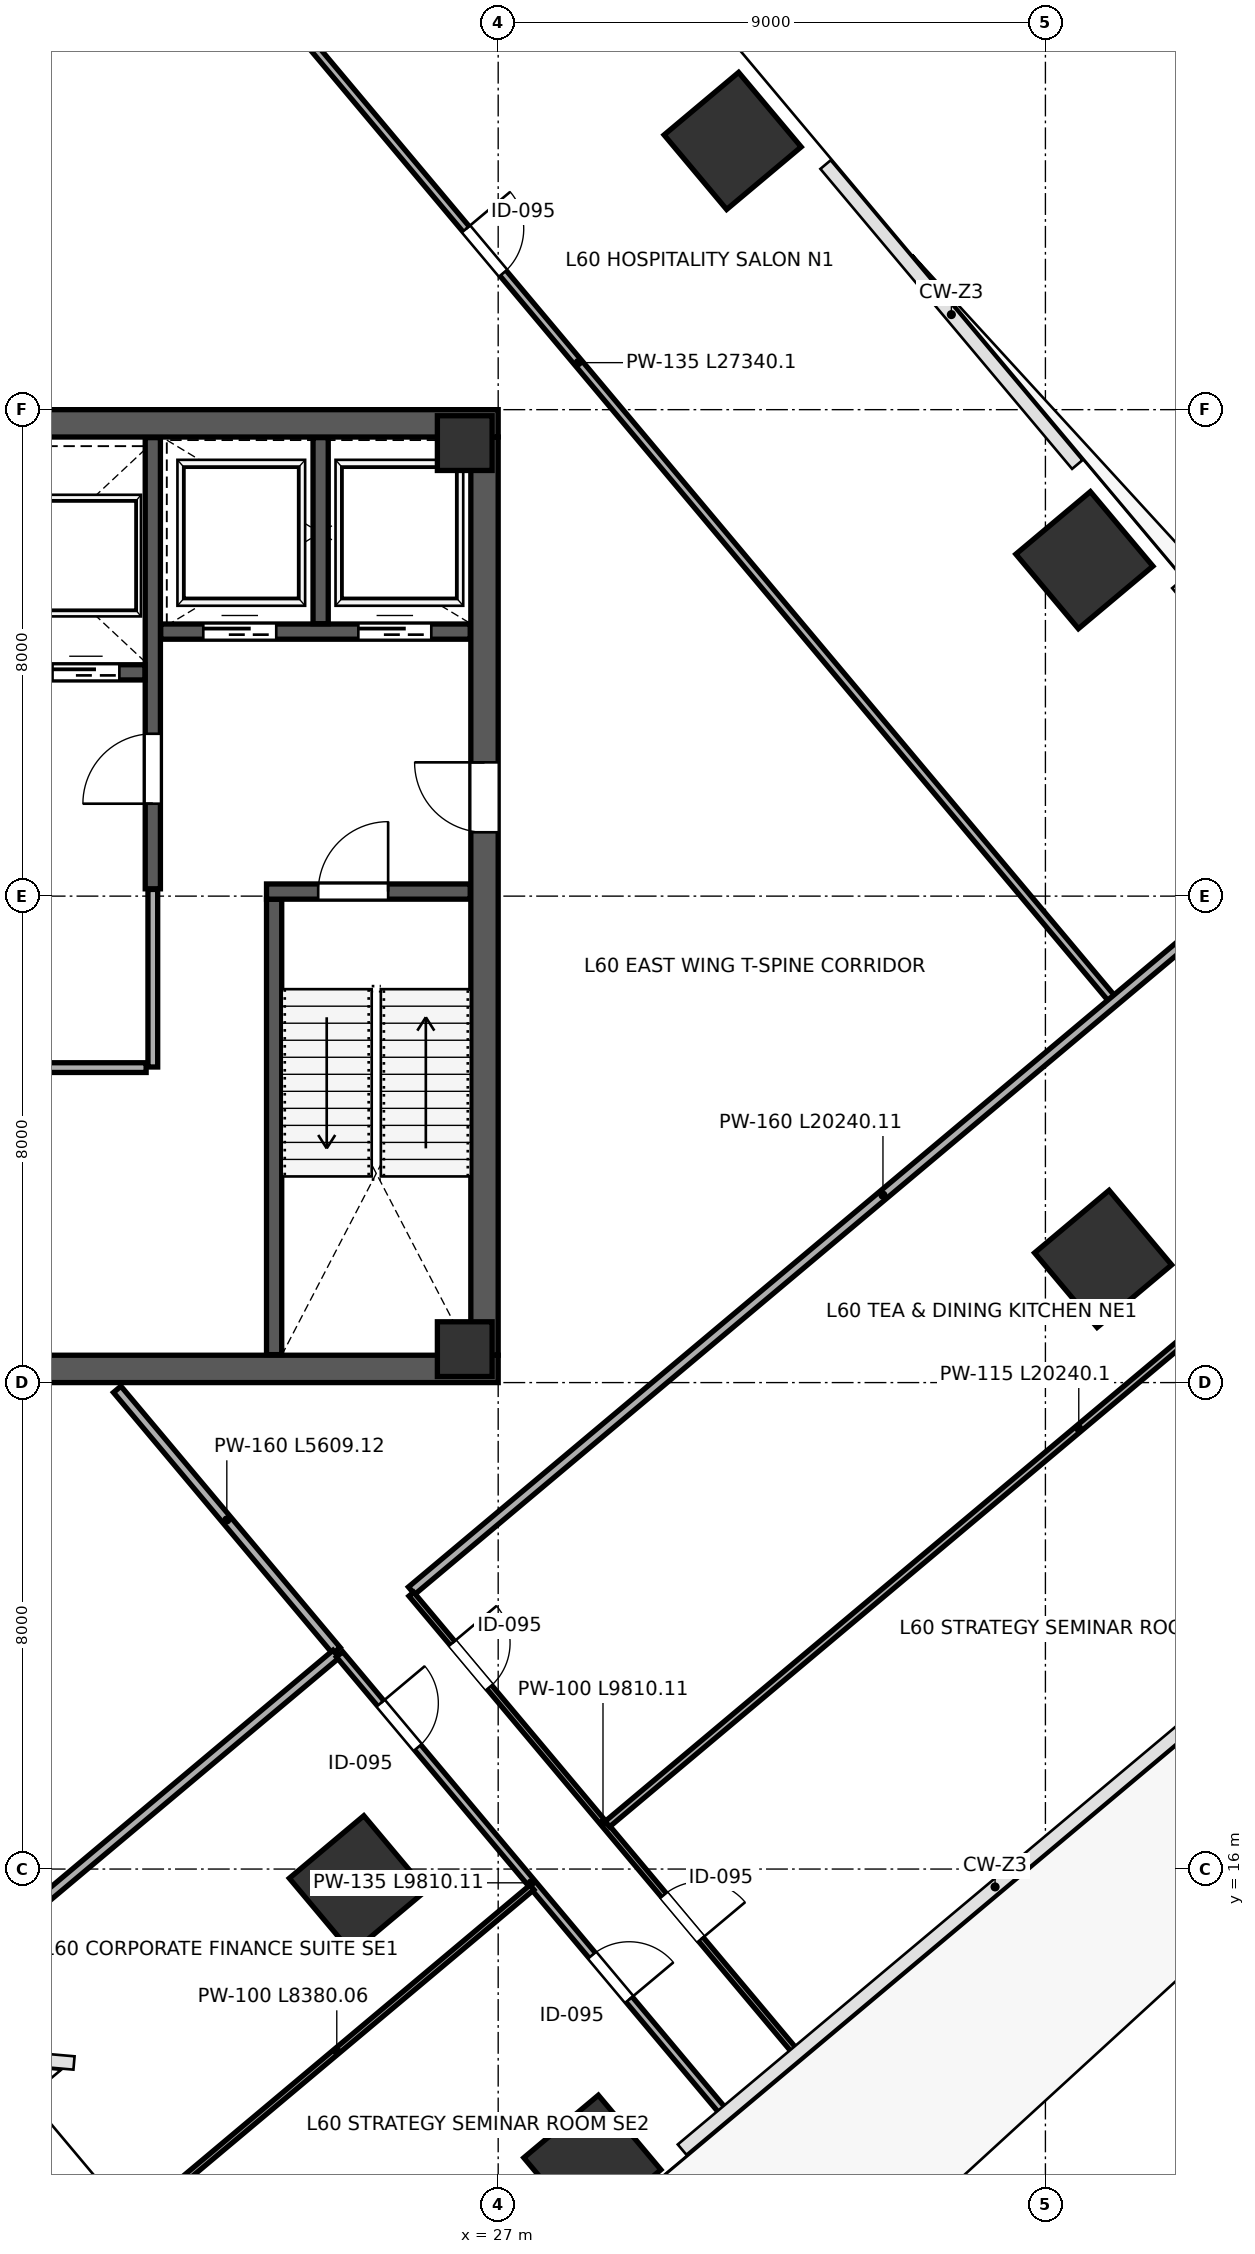
"""IFC4 building model, lengths in metres.
Left out: names, types, materials, properties, quantities, classifications, styles, units other than length and angle.
Written with IfcOpenShell. Run it as: python <this file> out.ifc"""

import sys

from ifc_helpers import new_model, si_unit, direction, frame, frame_2d, origin, origin_2d, place, context, subcontext, project, spatial, rectangle, extrude, source, transform, mapped, element, fill, save


model = new_model("IFC4")
c1 = context("Model", 3, precision=1e-05, world=origin(), true_north=direction((0.0, 1.0)))
c2 = subcontext(c1, "Body", "Model", "MODEL_VIEW")
j1 = project(units=[si_unit("LENGTHUNIT", "METRE"), si_unit("PLANEANGLEUNIT", "RADIAN")], contexts=[c1])
p1 = place(None, origin())
s1 = spatial("IfcSite", under=j1, at=p1, CompositionType="ELEMENT")
p2 = place(p1, origin())
s2 = spatial("IfcBuilding", under=s1, at=p2, CompositionType="ELEMENT")
p3 = place(p2, frame((0.0, 0.0, 266.8)))
s3 = spatial("IfcBuildingStorey", under=s2, at=p3, CompositionType="ELEMENT", Elevation=266.8)
m1 = source(origin(), c2, "Body", "SweptSolid", [
    extrude(rectangle(XDim=0.9, YDim=0.9, at=origin_2d()), origin(), (0.0, 0.0, 1.0), 4.198),
])
for number, where, z_axis, x_axis in (
    (1, (26.45, 24.55, 0.001), (0.0, 0.0, 1.0), (1.0, 0.0, 0.0)),
    (2, (26.45, 39.45, 0.001), (0.0, 0.0, 1.0), (1.0, 0.0, 0.0)),
):
    element("IfcColumn", number, at=place(p3, frame(where, z_axis=z_axis, x_axis=x_axis)), inside=s3, PredefinedType="COLUMN", context=c2, shape_type="MappedRepresentation", body=[
        mapped(m1, transform((0.0, 0.0, 0.0), scale=1.0)),
    ])
m2 = source(origin(), c2, "Body", "SweptSolid", [
    extrude(rectangle(XDim=1.6, YDim=1.6, at=origin_2d()), origin(), (0.0, 0.0, 1.0), 4.198),
])
for number, where, z_axis, x_axis in (
    (3, (30.856, 44.419, 0.001), (0.0, 0.0, 1.0), (-0.643, 0.766, 0.0)),
    (4, (36.641, 37.525, 0.001), (0.0, 0.0, 1.0), (-0.643, 0.766, 0.0)),
):
    element("IfcColumn", number, at=place(p3, frame(where, z_axis=z_axis, x_axis=x_axis)), inside=s3, PredefinedType="COLUMN", context=c2, shape_type="MappedRepresentation", body=[
        mapped(m2, transform((0.0, 0.0, 0.0), scale=1.0)),
    ])
m3 = source(origin(), c2, "Body", "SweptSolid", [
    extrude(rectangle(XDim=1.6, YDim=1.6, at=origin_2d()), origin(), (0.0, 0.0, 1.0), 4.198),
])
for number, where, z_axis, x_axis in (
    (5, (24.692, 15.75, 0.001), (0.0, 0.0, 1.0), (-0.643, 0.766, 0.0)),
    (6, (36.949, 26.035, 0.001), (0.0, 0.0, 1.0), (-0.643, 0.766, 0.0)),
):
    element("IfcColumn", number, at=place(p3, frame(where, z_axis=z_axis, x_axis=x_axis)), inside=s3, PredefinedType="COLUMN", context=c2, shape_type="MappedRepresentation", body=[
        mapped(m3, transform((0.0, 0.0, 0.0), scale=1.0)),
    ])
p4 = place(p3, frame((28.549, 11.154, 0.001), z_axis=(0.0, 0.0, 1.0), x_axis=(-0.642787609687, 0.766044443119, 0.0)))
e7 = element("IfcColumn", 7, at=p4, inside=s3, PredefinedType="COLUMN", context=c2, shape_type="MappedRepresentation", body=[
    mapped(m2, transform((0.0, 0.0, 0.0), scale=1.0)),
])
p5 = place(p3, frame((26.775, 24.45, 0.0), z_axis=(0.0, 0.0, 1.0), x_axis=(0.0, 1.0, 0.0)))
e8 = element("IfcWall", 8, at=p5, inside=s3, PredefinedType="SHEAR", context=c2, shape_type="SweptSolid", body=[
    extrude(rectangle(XDim=15.1, YDim=0.45, at=frame_2d((7.55, 0.0))), origin(), (0.0, 0.0, 1.0), 3.96),
])
p6 = place(p5, frame((8.6, 0.0, 0.0)))
e9 = element("IfcOpeningElement", 9, at=p6, cuts=e8, PredefinedType="OPENING", context=c2, shape_type="SweptSolid", body=[
    extrude(rectangle(XDim=1.15, YDim=2.2, at=frame_2d((0.575, 1.1))), frame((0.0, 0.235, 0.0), z_axis=(0.0, -1.0, 0.0), x_axis=(1.0, 0.0, 0.0)), (0.0, 0.0, 1.0), 0.47),
])
for number, where, z_axis, x_axis in (
    (10, (9.0, 24.225, 0.0), (0.0, 0.0, 1.0), (1.0, 0.0, 0.0)),
    (11, (9.0, 39.775, 0.0), (0.0, 0.0, 1.0), (1.0, 0.0, 0.0)),
):
    element("IfcWall", number, at=place(p3, frame(where, z_axis=z_axis, x_axis=x_axis)), inside=s3, PredefinedType="SHEAR", context=c2, shape_type="SweptSolid", body=[
        extrude(rectangle(XDim=18.0, YDim=0.45, at=frame_2d((9.0, 0.0))), origin(), (0.0, 0.0, 1.0), 3.96),
    ])
p7 = place(p3, frame((23.315, 24.46, 0.0), z_axis=(0.0, 0.0, 1.0), x_axis=(0.0, 1.0, 0.0)))
e12 = element("IfcWall", 12, at=p7, inside=s3, PredefinedType="SHEAR", context=c2, shape_type="SweptSolid", body=[
    extrude(rectangle(XDim=7.49, YDim=0.25, at=frame_2d((3.745, 0.0))), origin(), (0.0, 0.0, 1.0), 3.96),
])
p8 = place(p3, frame((23.19, 32.075, 0.0), z_axis=(0.0, 0.0, 1.0), x_axis=(1.0, 0.0, 0.0)))
e13 = element("IfcWall", 13, at=p8, inside=s3, PredefinedType="SHEAR", context=c2, shape_type="SweptSolid", body=[
    extrude(rectangle(XDim=3.35, YDim=0.25, at=frame_2d((1.675, 0.0))), origin(), (0.0, 0.0, 1.0), 3.96),
])
p9 = place(p8, frame((0.85, 0.0, 0.0)))
e14 = element("IfcOpeningElement", 14, at=p9, cuts=e13, PredefinedType="OPENING", context=c2, shape_type="SweptSolid", body=[
    extrude(rectangle(XDim=1.15, YDim=2.2, at=frame_2d((0.575, 1.1))), frame((0.0, 0.135, 0.0), z_axis=(0.0, -1.0, 0.0), x_axis=(1.0, 0.0, 0.0)), (0.0, 0.0, 1.0), 0.27),
])
p10 = place(p3, frame((21.32, 32.12, 0.0), z_axis=(0.0, 0.0, 1.0), x_axis=(0.0, 1.0, 0.0)))
e15 = element("IfcWall", 15, at=p10, inside=s3, PredefinedType="SHEAR", context=c2, shape_type="SweptSolid", body=[
    extrude(rectangle(XDim=7.42, YDim=0.25, at=frame_2d((3.71, 0.0))), origin(), (0.0, 0.0, 1.0), 3.96),
])
p11 = place(p10, frame((1.4, 0.0, 0.0)))
e16 = element("IfcOpeningElement", 16, at=p11, cuts=e15, PredefinedType="OPENING", context=c2, shape_type="SweptSolid", body=[
    extrude(rectangle(XDim=1.15, YDim=2.2, at=frame_2d((0.575, 1.1))), frame((0.0, 0.135, 0.0), z_axis=(0.0, -1.0, 0.0), x_axis=(1.0, 0.0, 0.0)), (0.0, 0.0, 1.0), 0.27),
])
p12 = place(p3, frame((21.45, 36.35, 0.0), z_axis=(0.0, 0.0, 1.0), x_axis=(1.0, 0.0, 0.0)))
e17 = element("IfcWall", 17, at=p12, inside=s3, PredefinedType="SHEAR", context=c2, shape_type="SweptSolid", body=[
    extrude(rectangle(XDim=5.09, YDim=0.25, at=frame_2d((2.545, 0.0))), origin(), (0.0, 0.0, 1.0), 3.96),
])
p13 = place(p12, frame((0.7, 0.0, 0.0)))
e18 = element("IfcOpeningElement", 18, at=p13, cuts=e17, PredefinedType="OPENING", context=c2, shape_type="SweptSolid", body=[
    extrude(rectangle(XDim=1.2, YDim=2.2, at=frame_2d((0.6, 1.1))), frame((0.0, 0.135, 0.0), z_axis=(0.0, -1.0, 0.0), x_axis=(1.0, 0.0, 0.0)), (0.0, 0.0, 1.0), 0.27),
])
p14 = place(p12, frame((3.25, 0.0, 0.0)))
e19 = element("IfcOpeningElement", 19, at=p14, cuts=e17, PredefinedType="OPENING", context=c2, shape_type="SweptSolid", body=[
    extrude(rectangle(XDim=1.2, YDim=2.2, at=frame_2d((0.6, 1.1))), frame((0.0, 0.135, 0.0), z_axis=(0.0, -1.0, 0.0), x_axis=(1.0, 0.0, 0.0)), (0.0, 0.0, 1.0), 0.27),
])
p15 = place(p3, frame((24.08, 36.48, 0.0), z_axis=(0.0, 0.0, 1.0), x_axis=(0.0, 1.0, 0.0)))
e20 = element("IfcWall", 20, at=p15, inside=s3, PredefinedType="SHEAR", context=c2, shape_type="SweptSolid", body=[
    extrude(rectangle(XDim=3.06, YDim=0.25, at=frame_2d((1.53, 0.0))), origin(), (0.0, 0.0, 1.0), 3.96),
])
p16 = place(p3, frame((17.32, 35.68, 0.0), z_axis=(0.0, 0.0, 1.0), x_axis=(1.0, 0.0, 0.0)))
e21 = element("IfcWall", 21, at=p16, inside=s3, PredefinedType="SHEAR", context=c2, shape_type="SweptSolid", body=[
    extrude(rectangle(XDim=3.87, YDim=0.25, at=frame_2d((1.935, 0.0))), origin(), (0.0, 0.0, 1.0), 3.96),
])
p17 = place(p16, frame((0.45, 0.0, 0.0)))
e22 = element("IfcOpeningElement", 22, at=p17, cuts=e21, PredefinedType="OPENING", context=c2, shape_type="SweptSolid", body=[
    extrude(rectangle(XDim=1.1, YDim=2.2, at=frame_2d((0.55, 1.1))), frame((0.0, 0.135, 0.0), z_axis=(0.0, -1.0, 0.0), x_axis=(1.0, 0.0, 0.0)), (0.0, 0.0, 1.0), 0.27),
])
p18 = place(p16, frame((2.35, 0.0, 0.0)))
e23 = element("IfcOpeningElement", 23, at=p18, cuts=e21, PredefinedType="OPENING", context=c2, shape_type="SweptSolid", body=[
    extrude(rectangle(XDim=1.1, YDim=2.2, at=frame_2d((0.55, 1.1))), frame((0.0, 0.135, 0.0), z_axis=(0.0, -1.0, 0.0), x_axis=(1.0, 0.0, 0.0)), (0.0, 0.0, 1.0), 0.27),
])
p19 = place(p3, frame((12.84, 29.18, 0.0), z_axis=(0.0, 0.0, 1.0), x_axis=(1.0, 0.0, 0.0)))
e24 = element("IfcWall", 24, at=p19, inside=s3, PredefinedType="PARTITIONING", context=c2, shape_type="SweptSolid", body=[
    extrude(rectangle(XDim=8.37, YDim=0.16, at=frame_2d((4.185, 0.0))), origin(), (0.0, 0.0, 1.0), 3.96),
])
p20 = place(p19, frame((0.95, 0.0, 0.0)))
e25 = element("IfcOpeningElement", 25, at=p20, cuts=e24, PredefinedType="OPENING", context=c2, shape_type="SweptSolid", body=[
    extrude(rectangle(XDim=0.85, YDim=2.1, at=frame_2d((0.425, 1.05))), frame((0.0, 0.09, 0.0), z_axis=(0.0, -1.0, 0.0), x_axis=(1.0, 0.0, 0.0)), (0.0, 0.0, 1.0), 0.18),
])
p21 = place(p19, frame((4.2, 0.0, 0.0)))
e26 = element("IfcOpeningElement", 26, at=p21, cuts=e24, PredefinedType="OPENING", context=c2, shape_type="SweptSolid", body=[
    extrude(rectangle(XDim=0.85, YDim=2.1, at=frame_2d((0.425, 1.05))), frame((0.0, 0.09, 0.0), z_axis=(0.0, -1.0, 0.0), x_axis=(1.0, 0.0, 0.0)), (0.0, 0.0, 1.0), 0.18),
])
p22 = place(p3, frame((21.32, 29.19, 0.0), z_axis=(0.0, 0.0, 1.0), x_axis=(0.0, 1.0, 0.0)))
e27 = element("IfcWall", 27, at=p22, inside=s3, PredefinedType="PARTITIONING", context=c2, shape_type="SweptSolid", body=[
    extrude(rectangle(XDim=2.92, YDim=0.16, at=frame_2d((1.46, 0.0))), origin(), (0.0, 0.0, 1.0), 3.96),
])
p23 = place(p3, frame((20.734, 23.889, 0.0), z_axis=(0.0, 0.0, 1.0), x_axis=(0.642758145725, -0.766069165353, 0.0)))
e28 = element("IfcWall", 28, at=p23, inside=s3, PredefinedType="PARTITIONING", context=c2, shape_type="SweptSolid", body=[
    extrude(rectangle(XDim=5.609, YDim=0.16, at=frame_2d((2.804, 0.0))), origin(), (0.0, 0.0, 1.0), 3.96),
])
p24 = place(p3, frame((19.528, 51.245, 0.0), z_axis=(0.0, 0.0, 1.0), x_axis=(0.642782364439, -0.766048844374, 0.0)))
e29 = element("IfcWall", 29, at=p24, inside=s3, PredefinedType="PARTITIONING", context=c2, shape_type="SweptSolid", body=[
    extrude(rectangle(XDim=27.34, YDim=0.135, at=frame_2d((13.67, 0.0))), origin(), (0.0, 0.0, 1.0), 3.96),
])
p25 = place(p24, frame((10.8, 0.0, 0.0)))
e30 = element("IfcOpeningElement", 30, at=p25, cuts=e29, PredefinedType="OPENING", context=c2, shape_type="SweptSolid", body=[
    extrude(rectangle(XDim=0.95, YDim=2.15, at=frame_2d((0.475, 1.075))), frame((0.0, 0.078, 0.0), z_axis=(0.0, -1.0, 0.0), x_axis=(1.0, 0.0, 0.0)), (0.0, 0.0, 1.0), 0.155),
])
p26 = place(p3, frame((0.849, 35.624, 0.0), z_axis=(0.0, 0.0, 1.0), x_axis=(0.766042777978, 0.642789594119, 0.0)))
e31 = element("IfcWall", 31, at=p26, inside=s3, PredefinedType="PARTITIONING", context=c2, shape_type="SweptSolid", body=[
    extrude(rectangle(XDim=29.51, YDim=0.1, at=frame_2d((14.755, 0.0))), origin(), (0.0, 0.0, 1.0), 3.96),
])
p27 = place(p26, frame((2.6, 0.0, 0.0)))
e32 = element("IfcOpeningElement", 32, at=p27, cuts=e31, PredefinedType="OPENING", context=c2, shape_type="SweptSolid", body=[
    extrude(rectangle(XDim=0.95, YDim=2.15, at=frame_2d((0.475, 1.075))), frame((0.0, 0.06, 0.0), z_axis=(0.0, -1.0, 0.0), x_axis=(1.0, 0.0, 0.0)), (0.0, 0.0, 1.0), 0.12),
])
p28 = place(p3, frame((25.576, 20.577, 0.0), z_axis=(0.0, 0.0, 1.0), x_axis=(0.76604764673, 0.642783791752, 0.0)))
e33 = element("IfcWall", 33, at=p28, inside=s3, PredefinedType="PARTITIONING", context=c2, shape_type="SweptSolid", body=[
    extrude(rectangle(XDim=20.24, YDim=0.16, at=frame_2d((10.12, 0.0))), origin(), (0.0, 0.0, 1.0), 3.195),
])
p29 = place(p3, frame((16.711, 13.139, 0.0), z_axis=(0.0, 0.0, 1.0), x_axis=(0.766041122188, 0.642791567398, 0.0)))
e34 = element("IfcWall", 34, at=p29, inside=s3, PredefinedType="PARTITIONING", context=c2, shape_type="SweptSolid", body=[
    extrude(rectangle(XDim=9.952, YDim=0.16, at=frame_2d((4.976, 0.0))), origin(), (0.0, 0.0, 1.0), 3.96),
])
p30 = place(p3, frame((25.571, 20.521, 0.0), z_axis=(0.0, 0.0, 1.0), x_axis=(0.64278520229, -0.766046463158, 0.0)))
e35 = element("IfcWall", 35, at=p30, inside=s3, PredefinedType="PARTITIONING", context=c2, shape_type="SweptSolid", body=[
    extrude(rectangle(XDim=9.81, YDim=0.1, at=frame_2d((4.905, 0.0))), origin(), (0.0, 0.0, 1.0), 3.96),
])
p31 = place(p30, frame((1.05, 0.0, 0.0)))
e36 = element("IfcOpeningElement", 36, at=p31, cuts=e35, PredefinedType="OPENING", context=c2, shape_type="SweptSolid", body=[
    extrude(rectangle(XDim=0.95, YDim=2.15, at=frame_2d((0.475, 1.075))), frame((0.0, 0.06, 0.0), z_axis=(0.0, -1.0, 0.0), x_axis=(1.0, 0.0, 0.0)), (0.0, 0.0, 1.0), 0.12),
])
p32 = place(p30, frame((6.46, 0.0, 0.0)))
e37 = element("IfcOpeningElement", 37, at=p32, cuts=e35, PredefinedType="OPENING", context=c2, shape_type="SweptSolid", body=[
    extrude(rectangle(XDim=0.95, YDim=2.15, at=frame_2d((0.475, 1.075))), frame((0.0, 0.06, 0.0), z_axis=(0.0, -1.0, 0.0), x_axis=(1.0, 0.0, 0.0)), (0.0, 0.0, 1.0), 0.12),
])
p33 = place(p3, frame((24.391, 19.531, 0.0), z_axis=(0.0, 0.0, 1.0), x_axis=(0.642797456481, -0.76603618057, 0.0)))
e38 = element("IfcWall", 38, at=p33, inside=s3, PredefinedType="PARTITIONING", context=c2, shape_type="SweptSolid", body=[
    extrude(rectangle(XDim=9.81, YDim=0.135, at=frame_2d((4.905, 0.0))), origin(), (0.0, 0.0, 1.0), 3.96),
])
p34 = place(p33, frame((1.05, 0.0, 0.0)))
e39 = element("IfcOpeningElement", 39, at=p34, cuts=e38, PredefinedType="OPENING", context=c2, shape_type="SweptSolid", body=[
    extrude(rectangle(XDim=0.95, YDim=2.15, at=frame_2d((0.475, 1.075))), frame((0.0, 0.078, 0.0), z_axis=(0.0, -1.0, 0.0), x_axis=(1.0, 0.0, 0.0)), (0.0, 0.0, 1.0), 0.155),
])
p35 = place(p33, frame((6.46, 0.0, 0.0)))
e40 = element("IfcOpeningElement", 40, at=p35, cuts=e38, PredefinedType="OPENING", context=c2, shape_type="SweptSolid", body=[
    extrude(rectangle(XDim=0.95, YDim=2.15, at=frame_2d((0.475, 1.075))), frame((0.0, 0.078, 0.0), z_axis=(0.0, -1.0, 0.0), x_axis=(1.0, 0.0, 0.0)), (0.0, 0.0, 1.0), 0.155),
])
p36 = place(p3, frame((28.796, 16.74, 0.0), z_axis=(0.0, 0.0, 1.0), x_axis=(0.766036723368, 0.642796809616, 0.0)))
e41 = element("IfcWall", 41, at=p36, inside=s3, PredefinedType="PARTITIONING", context=c2, shape_type="SweptSolid", body=[
    extrude(rectangle(XDim=20.24, YDim=0.115, at=frame_2d((10.12, 0.0))), origin(), (0.0, 0.0, 1.0), 3.96),
])
p37 = place(p3, frame((21.136, 10.312, 0.0), z_axis=(0.0, 0.0, 1.0), x_axis=(0.766048541695, 0.642782725162, 0.0)))
e42 = element("IfcWall", 42, at=p37, inside=s3, PredefinedType="PARTITIONING", context=c2, shape_type="SweptSolid", body=[
    extrude(rectangle(XDim=8.38, YDim=0.1, at=frame_2d((4.19, 0.0))), origin(), (0.0, 0.0, 1.0), 3.96),
])
m4 = source(origin(), c2, "Body", "SweptSolid", [
    extrude(rectangle(XDim=1.15, YDim=2.2, at=frame_2d((0.575, 1.1))), frame((0.0, 0.025, 0.0), z_axis=(0.0, -1.0, 0.0), x_axis=(1.0, 0.0, 0.0)), (0.0, 0.0, 1.0), 0.05),
])
p38 = place(p11, origin())
e43 = element("IfcDoor", 43, at=p38, inside=s3, OperationType="SINGLE_SWING_LEFT", PredefinedType="DOOR", context=c2, shape_type="MappedRepresentation", body=[
    mapped(m4, transform((0.0, 0.0, 0.0), scale=1.0)),
])
fill(e16, e43)
m5 = source(origin(), c2, "Body", "SweptSolid", [
    extrude(rectangle(XDim=1.15, YDim=2.2, at=frame_2d((0.575, 1.1))), frame((0.0, 0.025, 0.0), z_axis=(0.0, -1.0, 0.0), x_axis=(1.0, 0.0, 0.0)), (0.0, 0.0, 1.0), 0.05),
])
p39 = place(p9, origin())
e44 = element("IfcDoor", 44, at=p39, inside=s3, OperationType="SINGLE_SWING_RIGHT", PredefinedType="DOOR", context=c2, shape_type="MappedRepresentation", body=[
    mapped(m5, transform((0.0, 0.0, 0.0), scale=1.0)),
])
fill(e14, e44)
p40 = place(p6, origin())
e45 = element("IfcDoor", 45, at=p40, inside=s3, OperationType="SINGLE_SWING_RIGHT", PredefinedType="DOOR", context=c2, shape_type="MappedRepresentation", body=[
    mapped(m4, transform((0.0, 0.0, 0.0), scale=1.0)),
])
fill(e9, e45)
m6 = source(origin(), c2, "Body", "SweptSolid", [
    extrude(rectangle(XDim=1.1, YDim=2.2, at=frame_2d((0.55, 1.1))), frame((0.0, 0.025, 0.0), z_axis=(0.0, -1.0, 0.0), x_axis=(1.0, 0.0, 0.0)), (0.0, 0.0, 1.0), 0.05),
])
p41 = place(p18, origin())
e46 = element("IfcDoor", 46, at=p41, inside=s3, OperationType="SLIDING_TO_RIGHT", PredefinedType="DOOR", context=c2, shape_type="MappedRepresentation", body=[
    mapped(m6, transform((0.0, 0.0, 0.0), scale=1.0)),
])
fill(e23, e46)
m7 = source(origin(), c2, "Body", "SweptSolid", [
    extrude(rectangle(XDim=1.2, YDim=2.2, at=frame_2d((0.6, 1.1))), frame((0.0, 0.025, 0.0), z_axis=(0.0, -1.0, 0.0), x_axis=(1.0, 0.0, 0.0)), (0.0, 0.0, 1.0), 0.05),
])
p42 = place(p13, origin())
e47 = element("IfcDoor", 47, at=p42, inside=s3, OperationType="SLIDING_TO_LEFT", PredefinedType="DOOR", context=c2, shape_type="MappedRepresentation", body=[
    mapped(m7, transform((0.0, 0.0, 0.0), scale=1.0)),
])
fill(e18, e47)
p43 = place(p14, origin())
e48 = element("IfcDoor", 48, at=p43, inside=s3, OperationType="SLIDING_TO_RIGHT", PredefinedType="DOOR", context=c2, shape_type="MappedRepresentation", body=[
    mapped(m7, transform((0.0, 0.0, 0.0), scale=1.0)),
])
fill(e19, e48)
m8 = source(origin(), c2, "Body", "SweptSolid", [
    extrude(rectangle(XDim=0.95, YDim=2.15, at=frame_2d((0.475, 1.075))), frame((0.0, 0.025, 0.0), z_axis=(0.0, -1.0, 0.0), x_axis=(1.0, 0.0, 0.0)), (0.0, 0.0, 1.0), 0.05),
])
p44 = place(p25, origin())
e49 = element("IfcDoor", 49, at=p44, inside=s3, OperationType="SINGLE_SWING_LEFT", PredefinedType="DOOR", context=c2, shape_type="MappedRepresentation", body=[
    mapped(m8, transform((0.0, 0.0, 0.0), scale=1.0)),
])
fill(e30, e49)
p45 = place(p31, origin())
e50 = element("IfcDoor", 50, at=p45, inside=s3, OperationType="SINGLE_SWING_LEFT", PredefinedType="DOOR", context=c2, shape_type="MappedRepresentation", body=[
    mapped(m8, transform((0.0, 0.0, 0.0), scale=1.0)),
])
fill(e36, e50)
p46 = place(p32, origin())
e51 = element("IfcDoor", 51, at=p46, inside=s3, OperationType="SINGLE_SWING_RIGHT", PredefinedType="DOOR", context=c2, shape_type="MappedRepresentation", body=[
    mapped(m8, transform((0.0, 0.0, 0.0), scale=1.0)),
])
fill(e37, e51)
p47 = place(p34, origin())
e52 = element("IfcDoor", 52, at=p47, inside=s3, OperationType="SINGLE_SWING_LEFT", PredefinedType="DOOR", context=c2, shape_type="MappedRepresentation", body=[
    mapped(m8, transform((0.0, 0.0, 0.0), scale=1.0)),
])
fill(e39, e52)
p48 = place(p35, origin())
e53 = element("IfcDoor", 53, at=p48, inside=s3, OperationType="SINGLE_SWING_RIGHT", PredefinedType="DOOR", context=c2, shape_type="MappedRepresentation", body=[
    mapped(m8, transform((0.0, 0.0, 0.0), scale=1.0)),
])
fill(e40, e53)
save(model, sys.argv[1])
